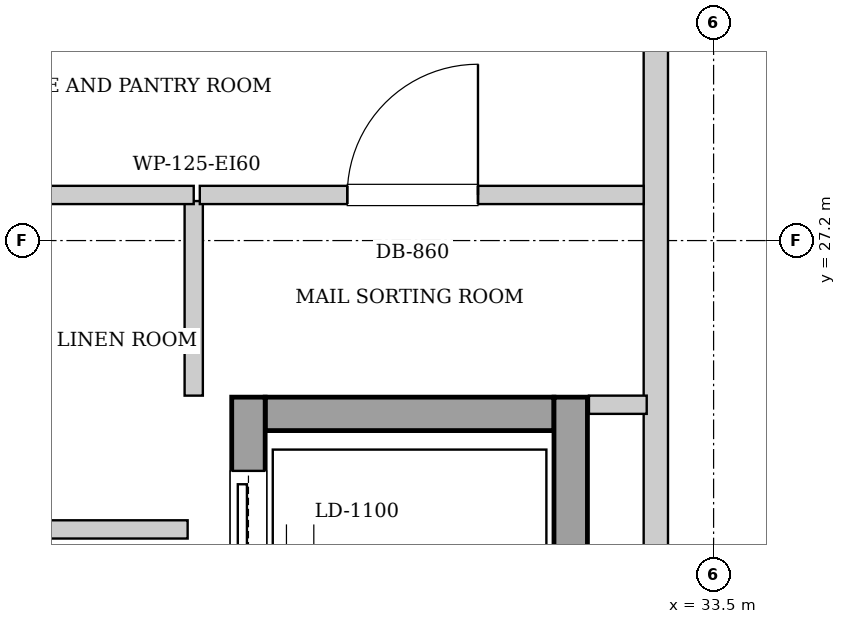
"""IFC4 building model, lengths in metres.
Left out: names, types, materials, properties, quantities, classifications, styles, units other than length and angle.
Written with IfcOpenShell. Run it as: python <this file> out.ifc"""

import sys

from ifc_helpers import new_model, si_unit, direction, frame, frame_2d, origin, place, context, subcontext, project, spatial, rectangle, extrude, element, fill, save


model = new_model("IFC4")
c1 = context("Model", 3, precision=1e-05, world=origin(), true_north=direction((0.0, 1.0)))
c2 = subcontext(c1, "Body", "Model", "MODEL_VIEW")
j1 = project(units=[si_unit("LENGTHUNIT", "METRE"), si_unit("PLANEANGLEUNIT", "RADIAN")], contexts=[c1])
p1 = place(None, origin())
s1 = spatial("IfcSite", under=j1, at=p1, CompositionType="ELEMENT")
p2 = place(p1, origin())
s2 = spatial("IfcBuilding", under=s1, at=p2, CompositionType="ELEMENT")
p3 = place(p2, frame((0.0, 0.0, 258.1)))
s3 = spatial("IfcBuildingStorey", under=s2, at=p3, CompositionType="ELEMENT", Elevation=258.1)
p4 = place(p3, frame((30.55, 26.06, 0.0), z_axis=(0.0, 0.0, 1.0), x_axis=(1.0, 0.0, 0.0)))
e1 = element("IfcWall", 1, at=p4, inside=s3, PredefinedType="SHEAR", context=c2, shape_type="SweptSolid", body=[
    extrude(rectangle(XDim=1.9, YDim=0.22, at=frame_2d((0.95, 0.0))), origin(), (0.0, 0.0, 1.0), 3.05),
])
p5 = place(p3, frame((30.44, 24.1, 0.0), z_axis=(0.0, 0.0, 1.0), x_axis=(0.0, 1.0, 0.0)))
e2 = element("IfcWall", 2, at=p5, inside=s3, PredefinedType="SHEAR", context=c2, shape_type="SweptSolid", body=[
    extrude(rectangle(XDim=2.07, YDim=0.22, at=frame_2d((1.035, 0.0))), origin(), (0.0, 0.0, 1.0), 3.05),
])
p6 = place(p5, frame((0.485, 0.0, 0.0)))
e3 = element("IfcOpeningElement", 3, at=p6, cuts=e2, PredefinedType="OPENING", context=c2, shape_type="SweptSolid", body=[
    extrude(rectangle(XDim=1.1, YDim=2.15, at=frame_2d((0.55, 1.075))), frame((0.0, 0.12, 0.0), z_axis=(0.0, -1.0, 0.0), x_axis=(1.0, 0.0, 0.0)), (0.0, 0.0, 1.0), 0.24),
])
p7 = place(p3, frame((32.56, 24.1, 0.0), z_axis=(0.0, 0.0, 1.0), x_axis=(0.0, 1.0, 0.0)))
e4 = element("IfcWall", 4, at=p7, inside=s3, PredefinedType="SHEAR", context=c2, shape_type="SweptSolid", body=[
    extrude(rectangle(XDim=2.07, YDim=0.22, at=frame_2d((1.035, 0.0))), origin(), (0.0, 0.0, 1.0), 3.05),
])
p8 = place(p3, frame((33.12, 24.12, 0.0), z_axis=(0.0, 0.0, 1.0), x_axis=(0.0, 1.0, 0.0)))
e5 = element("IfcWall", 5, at=p8, inside=s3, PredefinedType="PARTITIONING", context=c2, shape_type="SweptSolid", body=[
    extrude(rectangle(XDim=4.76, YDim=0.16, at=frame_2d((2.38, 0.0))), origin(), (0.0, 0.0, 1.0), 2.385),
])
p9 = place(p3, frame((30.08, 26.18, 0.0), z_axis=(0.0, 0.0, 1.0), x_axis=(0.0, 1.0, 0.0)))
e6 = element("IfcWall", 6, at=p9, inside=s3, PredefinedType="PARTITIONING", context=c2, shape_type="SweptSolid", body=[
    extrude(rectangle(XDim=1.28, YDim=0.12, at=frame_2d((0.64, 0.0))), origin(), (0.0, 0.0, 1.0), 3.05),
])
p10 = place(p3, frame((32.68, 26.12, 0.0), z_axis=(0.0, 0.0, 1.0), x_axis=(1.0, 0.0, 0.0)))
e7 = element("IfcWall", 7, at=p10, inside=s3, PredefinedType="PARTITIONING", context=c2, shape_type="SweptSolid", body=[
    extrude(rectangle(XDim=0.38, YDim=0.12, at=frame_2d((0.19, 0.0))), origin(), (0.0, 0.0, 1.0), 3.05),
])
p11 = place(p3, frame((30.12, 27.5, 0.0), z_axis=(0.0, 0.0, 1.0), x_axis=(1.0, 0.0, 0.0)))
e8 = element("IfcWall", 8, at=p11, inside=s3, PredefinedType="PARTITIONING", context=c2, shape_type="SweptSolid", body=[
    extrude(rectangle(XDim=2.92, YDim=0.12, at=frame_2d((1.46, 0.0))), origin(), (0.0, 0.0, 1.0), 3.05),
])
p12 = place(p11, frame((0.97, 0.0, 0.0)))
e9 = element("IfcOpeningElement", 9, at=p12, cuts=e8, PredefinedType="OPENING", context=c2, shape_type="SweptSolid", body=[
    extrude(rectangle(XDim=0.86, YDim=2.05, at=frame_2d((0.43, 1.025))), frame((0.0, 0.07, 0.0), z_axis=(0.0, -1.0, 0.0), x_axis=(1.0, 0.0, 0.0)), (0.0, 0.0, 1.0), 0.14),
])
p13 = place(p3, frame((25.72, 27.5, 0.0), z_axis=(0.0, 0.0, 1.0), x_axis=(1.0, 0.0, 0.0)))
e10 = element("IfcWall", 10, at=p13, inside=s3, PredefinedType="PARTITIONING", context=c2, shape_type="SweptSolid", body=[
    extrude(rectangle(XDim=4.36, YDim=0.12, at=frame_2d((2.18, 0.0))), origin(), (0.0, 0.0, 1.0), 3.05),
])
p14 = place(p3, frame((25.72, 25.3, 0.0), z_axis=(0.0, 0.0, 1.0), x_axis=(1.0, 0.0, 0.0)))
e11 = element("IfcWall", 11, at=p14, inside=s3, PredefinedType="PARTITIONING", context=c2, shape_type="SweptSolid", body=[
    extrude(rectangle(XDim=4.32, YDim=0.12, at=frame_2d((2.16, 0.0))), origin(), (0.0, 0.0, 1.0), 3.05),
])
p15 = place(p14, frame((1.65, 0.0, 0.0)))
e12 = element("IfcOpeningElement", 12, at=p15, cuts=e11, PredefinedType="OPENING", context=c2, shape_type="SweptSolid", body=[
    extrude(rectangle(XDim=0.9, YDim=2.05, at=frame_2d((0.45, 1.025))), frame((0.0, 0.07, 0.0), z_axis=(0.0, -1.0, 0.0), x_axis=(1.0, 0.0, 0.0)), (0.0, 0.0, 1.0), 0.14),
])
p16 = place(p6, origin())
e13 = element("IfcDoor", 13, at=p16, inside=s3, OperationType="SLIDING_TO_LEFT", PredefinedType="DOOR", context=c2, shape_type="SweptSolid", body=[
    extrude(rectangle(XDim=1.1, YDim=2.15, at=frame_2d((0.55, 1.075))), frame((0.0, 0.025, 0.0), z_axis=(0.0, -1.0, 0.0), x_axis=(1.0, 0.0, 0.0)), (0.0, 0.0, 1.0), 0.05),
])
fill(e3, e13)
p17 = place(p12, origin())
e14 = element("IfcDoor", 14, at=p17, inside=s3, OperationType="SINGLE_SWING_RIGHT", PredefinedType="DOOR", context=c2, shape_type="SweptSolid", body=[
    extrude(rectangle(XDim=0.86, YDim=2.05, at=frame_2d((0.43, 1.025))), frame((0.0, 0.025, 0.0), z_axis=(0.0, -1.0, 0.0), x_axis=(1.0, 0.0, 0.0)), (0.0, 0.0, 1.0), 0.05),
])
fill(e9, e14)
save(model, sys.argv[1])
